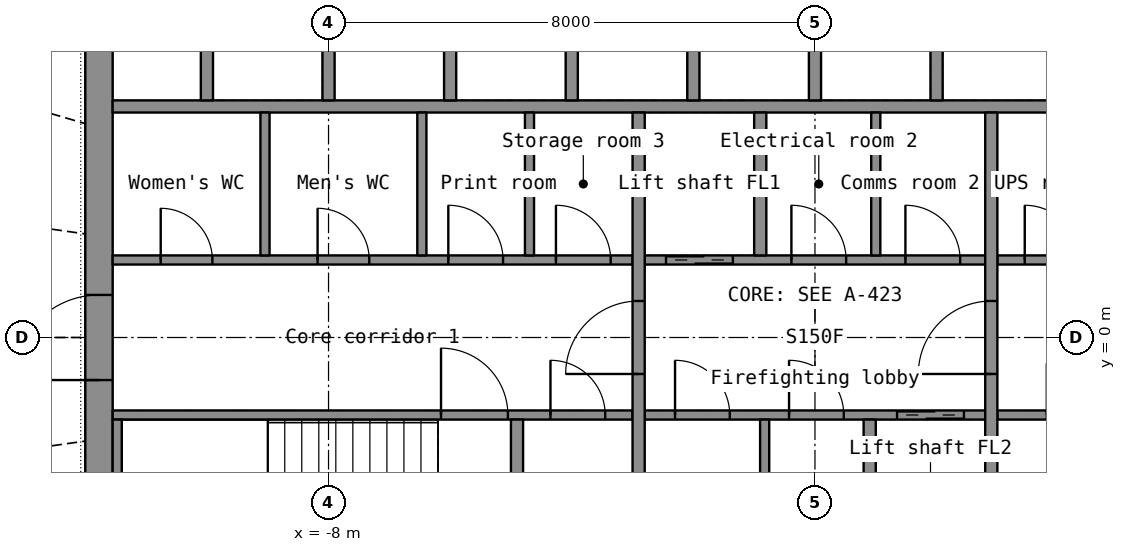
"""IFC4 building model, lengths in metres.
Left out: names, types, materials, properties, quantities, classifications, styles, units other than length and angle.
Written with IfcOpenShell. Run it as: python <this file> out.ifc"""

import sys

from ifc_helpers import new_model, si_unit, direction, frame, frame_2d, origin, place, context, subcontext, project, spatial, rectangle, extrude, element, fill, save


model = new_model("IFC4")
c1 = context("Model", 3, precision=1e-05, world=origin(), true_north=direction((0.0, 1.0)))
c2 = subcontext(c1, "Body", "Model", "MODEL_VIEW")
j1 = project(units=[si_unit("LENGTHUNIT", "METRE"), si_unit("PLANEANGLEUNIT", "RADIAN")], contexts=[c1])
p1 = place(None, origin())
s1 = spatial("IfcSite", under=j1, at=p1, CompositionType="ELEMENT")
p2 = place(p1, origin())
s2 = spatial("IfcBuilding", under=s1, at=p2, CompositionType="ELEMENT")
p3 = place(p2, frame((0.0, 0.0, 175.6)))
s3 = spatial("IfcBuildingStorey", under=s2, at=p3, CompositionType="ELEMENT", Elevation=175.6)
p4 = place(p3, frame((-11.775, -7.2, 0.0), z_axis=(0.0, 0.0, 1.0), x_axis=(0.0, 1.0, 0.0)))
e1 = element("IfcWall", 1, at=p4, inside=s3, PredefinedType="SHEAR", context=c2, shape_type="SweptSolid", body=[
    extrude(rectangle(XDim=14.4, YDim=0.45, at=frame_2d((7.2, 0.0))), origin(), (0.0, 0.0, 1.0), 3.3),
])
p5 = place(p4, frame((6.5, 0.0, 0.0)))
e2 = element("IfcOpeningElement", 2, at=p5, cuts=e1, PredefinedType="OPENING", context=c2, shape_type="SweptSolid", body=[
    extrude(rectangle(XDim=1.4, YDim=2.2, at=frame_2d((0.7, 1.1))), frame((0.0, 0.235, 0.0), z_axis=(0.0, -1.0, 0.0), x_axis=(1.0, 0.0, 0.0)), (0.0, 0.0, 1.0), 0.47),
])
p6 = place(p3, frame((-11.55, 3.8, 0.0), z_axis=(0.0, 0.0, 1.0), x_axis=(1.0, 0.0, 0.0)))
e3 = element("IfcWall", 3, at=p6, inside=s3, PredefinedType="SHEAR", context=c2, shape_type="SweptSolid", body=[
    extrude(rectangle(XDim=23.1, YDim=0.2, at=frame_2d((11.55, 0.0))), origin(), (0.0, 0.0, 1.0), 3.3),
])
for number, where, z_axis, x_axis in (
    (4, (-10.0, 3.9, 0.0), (0.0, 0.0, 1.0), (0.0, 1.0, 0.0)),
    (5, (-8.0, 3.9, 0.0), (0.0, 0.0, 1.0), (0.0, 1.0, 0.0)),
    (6, (-6.0, 3.9, 0.0), (0.0, 0.0, 1.0), (0.0, 1.0, 0.0)),
    (7, (-4.0, 3.9, 0.0), (0.0, 0.0, 1.0), (0.0, 1.0, 0.0)),
    (8, (-2.0, 3.9, 0.0), (0.0, 0.0, 1.0), (0.0, 1.0, 0.0)),
    (9, (0.0, 3.9, 0.0), (0.0, 0.0, 1.0), (0.0, 1.0, 0.0)),
    (10, (2.0, 3.9, 0.0), (0.0, 0.0, 1.0), (0.0, 1.0, 0.0)),
):
    element("IfcWall", number, at=place(p3, frame(where, z_axis=z_axis, x_axis=x_axis)), inside=s3, PredefinedType="SHEAR", context=c2, shape_type="SweptSolid", body=[
        extrude(rectangle(XDim=2.85, YDim=0.2, at=frame_2d((1.425, 0.0))), origin(), (0.0, 0.0, 1.0), 3.3),
    ])
p7 = place(p3, frame((-11.55, -1.275, 0.0), z_axis=(0.0, 0.0, 1.0), x_axis=(1.0, 0.0, 0.0)))
e11 = element("IfcWall", 11, at=p7, inside=s3, PredefinedType="SHEAR", context=c2, shape_type="SweptSolid", body=[
    extrude(rectangle(XDim=8.55, YDim=0.15, at=frame_2d((4.275, 0.0))), origin(), (0.0, 0.0, 1.0), 3.3),
])
p8 = place(p7, frame((5.4, 0.0, 0.0)))
e12 = element("IfcOpeningElement", 12, at=p8, cuts=e11, PredefinedType="OPENING", context=c2, shape_type="SweptSolid", body=[
    extrude(rectangle(XDim=1.1, YDim=2.15, at=frame_2d((0.55, 1.075))), frame((0.0, 0.085, 0.0), z_axis=(0.0, -1.0, 0.0), x_axis=(1.0, 0.0, 0.0)), (0.0, 0.0, 1.0), 0.17),
])
p9 = place(p7, frame((7.2, 0.0, 0.0)))
e13 = element("IfcOpeningElement", 13, at=p9, cuts=e11, PredefinedType="OPENING", context=c2, shape_type="SweptSolid", body=[
    extrude(rectangle(XDim=0.9, YDim=2.1, at=frame_2d((0.45, 1.05))), frame((0.0, 0.085, 0.0), z_axis=(0.0, -1.0, 0.0), x_axis=(1.0, 0.0, 0.0)), (0.0, 0.0, 1.0), 0.17),
])
p10 = place(p3, frame((-2.8, -1.275, 0.0), z_axis=(0.0, 0.0, 1.0), x_axis=(1.0, 0.0, 0.0)))
e14 = element("IfcWall", 14, at=p10, inside=s3, PredefinedType="SHEAR", context=c2, shape_type="SweptSolid", body=[
    extrude(rectangle(XDim=5.6, YDim=0.15, at=frame_2d((2.8, 0.0))), origin(), (0.0, 0.0, 1.0), 3.3),
])
p11 = place(p10, frame((4.15, 0.0, 0.0)))
e15 = element("IfcOpeningElement", 15, at=p11, cuts=e14, PredefinedType="OPENING", context=c2, shape_type="SweptSolid", body=[
    extrude(rectangle(XDim=1.1, YDim=2.2, at=frame_2d((0.55, 1.1))), frame((0.0, 0.085, 0.0), z_axis=(0.0, -1.0, 0.0), x_axis=(1.0, 0.0, 0.0)), (0.0, 0.0, 1.0), 0.17),
])
p12 = place(p10, frame((0.499, 0.0, 0.0)))
e16 = element("IfcOpeningElement", 16, at=p12, cuts=e14, PredefinedType="OPENING", context=c2, shape_type="SweptSolid", body=[
    extrude(rectangle(XDim=0.9, YDim=2.1, at=frame_2d((0.45, 1.05))), frame((0.0, 0.085, 0.0), z_axis=(0.0, -1.0, 0.0), x_axis=(1.0, 0.0, 0.0)), (0.0, 0.0, 1.0), 0.17),
])
p13 = place(p10, frame((2.374, 0.0, 0.0)))
e17 = element("IfcOpeningElement", 17, at=p13, cuts=e14, PredefinedType="OPENING", context=c2, shape_type="SweptSolid", body=[
    extrude(rectangle(XDim=0.9, YDim=2.1, at=frame_2d((0.45, 1.05))), frame((0.0, 0.085, 0.0), z_axis=(0.0, -1.0, 0.0), x_axis=(1.0, 0.0, 0.0)), (0.0, 0.0, 1.0), 0.17),
])
p14 = place(p3, frame((3.0, -1.275, 0.0), z_axis=(0.0, 0.0, 1.0), x_axis=(1.0, 0.0, 0.0)))
e18 = element("IfcWall", 18, at=p14, inside=s3, PredefinedType="PARTITIONING", context=c2, shape_type="SweptSolid", body=[
    extrude(rectangle(XDim=8.55, YDim=0.15, at=frame_2d((4.275, 0.0))), origin(), (0.0, 0.0, 1.0), 3.3),
])
p15 = place(p14, frame((0.812, 0.0, 0.0)))
e19 = element("IfcOpeningElement", 19, at=p15, cuts=e18, PredefinedType="OPENING", context=c2, shape_type="SweptSolid", body=[
    extrude(rectangle(XDim=0.85, YDim=2.1, at=frame_2d((0.425, 1.05))), frame((0.0, 0.085, 0.0), z_axis=(0.0, -1.0, 0.0), x_axis=(1.0, 0.0, 0.0)), (0.0, 0.0, 1.0), 0.17),
])
p16 = place(p14, frame((3.083, 0.0, 0.0)))
e20 = element("IfcOpeningElement", 20, at=p16, cuts=e18, PredefinedType="OPENING", context=c2, shape_type="SweptSolid", body=[
    extrude(rectangle(XDim=0.9, YDim=2.1, at=frame_2d((0.45, 1.05))), frame((0.0, 0.085, 0.0), z_axis=(0.0, -1.0, 0.0), x_axis=(1.0, 0.0, 0.0)), (0.0, 0.0, 1.0), 0.17),
])
p17 = place(p14, frame((6.12, 0.0, 0.0)))
e21 = element("IfcOpeningElement", 21, at=p17, cuts=e18, PredefinedType="OPENING", context=c2, shape_type="SweptSolid", body=[
    extrude(rectangle(XDim=0.9, YDim=2.1, at=frame_2d((0.45, 1.05))), frame((0.0, 0.085, 0.0), z_axis=(0.0, -1.0, 0.0), x_axis=(1.0, 0.0, 0.0)), (0.0, 0.0, 1.0), 0.17),
])
p18 = place(p3, frame((-11.55, 1.275, 0.0), z_axis=(0.0, 0.0, 1.0), x_axis=(1.0, 0.0, 0.0)))
e22 = element("IfcWall", 22, at=p18, inside=s3, PredefinedType="PARTITIONING", context=c2, shape_type="SweptSolid", body=[
    extrude(rectangle(XDim=8.55, YDim=0.15, at=frame_2d((4.275, 0.0))), origin(), (0.0, 0.0, 1.0), 3.3),
])
p19 = place(p18, frame((0.79, 0.0, 0.0)))
e23 = element("IfcOpeningElement", 23, at=p19, cuts=e22, PredefinedType="OPENING", context=c2, shape_type="SweptSolid", body=[
    extrude(rectangle(XDim=0.85, YDim=2.1, at=frame_2d((0.425, 1.05))), frame((0.0, 0.085, 0.0), z_axis=(0.0, -1.0, 0.0), x_axis=(1.0, 0.0, 0.0)), (0.0, 0.0, 1.0), 0.17),
])
p20 = place(p18, frame((3.37, 0.0, 0.0)))
e24 = element("IfcOpeningElement", 24, at=p20, cuts=e22, PredefinedType="OPENING", context=c2, shape_type="SweptSolid", body=[
    extrude(rectangle(XDim=0.85, YDim=2.1, at=frame_2d((0.425, 1.05))), frame((0.0, 0.085, 0.0), z_axis=(0.0, -1.0, 0.0), x_axis=(1.0, 0.0, 0.0)), (0.0, 0.0, 1.0), 0.17),
])
p21 = place(p18, frame((5.52, 0.0, 0.0)))
e25 = element("IfcOpeningElement", 25, at=p21, cuts=e22, PredefinedType="OPENING", context=c2, shape_type="SweptSolid", body=[
    extrude(rectangle(XDim=0.9, YDim=2.1, at=frame_2d((0.45, 1.05))), frame((0.0, 0.085, 0.0), z_axis=(0.0, -1.0, 0.0), x_axis=(1.0, 0.0, 0.0)), (0.0, 0.0, 1.0), 0.17),
])
p22 = place(p18, frame((7.29, 0.0, 0.0)))
e26 = element("IfcOpeningElement", 26, at=p22, cuts=e22, PredefinedType="OPENING", context=c2, shape_type="SweptSolid", body=[
    extrude(rectangle(XDim=0.9, YDim=2.1, at=frame_2d((0.45, 1.05))), frame((0.0, 0.085, 0.0), z_axis=(0.0, -1.0, 0.0), x_axis=(1.0, 0.0, 0.0)), (0.0, 0.0, 1.0), 0.17),
])
p23 = place(p3, frame((-2.8, 1.275, 0.0), z_axis=(0.0, 0.0, 1.0), x_axis=(1.0, 0.0, 0.0)))
e27 = element("IfcWall", 27, at=p23, inside=s3, PredefinedType="SHEAR", context=c2, shape_type="SweptSolid", body=[
    extrude(rectangle(XDim=5.6, YDim=0.15, at=frame_2d((2.8, 0.0))), origin(), (0.0, 0.0, 1.0), 3.3),
])
p24 = place(p23, frame((0.35, 0.0, 0.0)))
e28 = element("IfcOpeningElement", 28, at=p24, cuts=e27, PredefinedType="OPENING", context=c2, shape_type="SweptSolid", body=[
    extrude(rectangle(XDim=1.1, YDim=2.2, at=frame_2d((0.55, 1.1))), frame((0.0, 0.085, 0.0), z_axis=(0.0, -1.0, 0.0), x_axis=(1.0, 0.0, 0.0)), (0.0, 0.0, 1.0), 0.17),
])
p25 = place(p23, frame((2.413, 0.0, 0.0)))
e29 = element("IfcOpeningElement", 29, at=p25, cuts=e27, PredefinedType="OPENING", context=c2, shape_type="SweptSolid", body=[
    extrude(rectangle(XDim=0.9, YDim=2.1, at=frame_2d((0.45, 1.05))), frame((0.0, 0.085, 0.0), z_axis=(0.0, -1.0, 0.0), x_axis=(1.0, 0.0, 0.0)), (0.0, 0.0, 1.0), 0.17),
])
p26 = place(p23, frame((4.288, 0.0, 0.0)))
e30 = element("IfcOpeningElement", 30, at=p26, cuts=e27, PredefinedType="OPENING", context=c2, shape_type="SweptSolid", body=[
    extrude(rectangle(XDim=0.9, YDim=2.1, at=frame_2d((0.45, 1.05))), frame((0.0, 0.085, 0.0), z_axis=(0.0, -1.0, 0.0), x_axis=(1.0, 0.0, 0.0)), (0.0, 0.0, 1.0), 0.17),
])
p27 = place(p3, frame((3.0, 1.275, 0.0), z_axis=(0.0, 0.0, 1.0), x_axis=(1.0, 0.0, 0.0)))
e31 = element("IfcWall", 31, at=p27, inside=s3, PredefinedType="SHEAR", context=c2, shape_type="SweptSolid", body=[
    extrude(rectangle(XDim=8.55, YDim=0.15, at=frame_2d((4.275, 0.0))), origin(), (0.0, 0.0, 1.0), 3.3),
])
p28 = place(p27, frame((2.05, 0.0, 0.0)))
e32 = element("IfcOpeningElement", 32, at=p28, cuts=e31, PredefinedType="OPENING", context=c2, shape_type="SweptSolid", body=[
    extrude(rectangle(XDim=1.1, YDim=2.15, at=frame_2d((0.55, 1.075))), frame((0.0, 0.085, 0.0), z_axis=(0.0, -1.0, 0.0), x_axis=(1.0, 0.0, 0.0)), (0.0, 0.0, 1.0), 0.17),
])
p29 = place(p27, frame((0.45, 0.0, 0.0)))
e33 = element("IfcOpeningElement", 33, at=p29, cuts=e31, PredefinedType="OPENING", context=c2, shape_type="SweptSolid", body=[
    extrude(rectangle(XDim=0.9, YDim=2.1, at=frame_2d((0.45, 1.05))), frame((0.0, 0.085, 0.0), z_axis=(0.0, -1.0, 0.0), x_axis=(1.0, 0.0, 0.0)), (0.0, 0.0, 1.0), 0.17),
])
p30 = place(p3, frame((-2.9, -3.7, 0.0), z_axis=(0.0, 0.0, 1.0), x_axis=(0.0, 1.0, 0.0)))
e34 = element("IfcWall", 34, at=p30, inside=s3, PredefinedType="SHEAR", context=c2, shape_type="SweptSolid", body=[
    extrude(rectangle(XDim=7.4, YDim=0.2, at=frame_2d((3.7, 0.0))), origin(), (0.0, 0.0, 1.0), 3.3),
])
p31 = place(p30, frame((3.1, 0.0, 0.0)))
e35 = element("IfcOpeningElement", 35, at=p31, cuts=e34, PredefinedType="OPENING", context=c2, shape_type="SweptSolid", body=[
    extrude(rectangle(XDim=1.2, YDim=2.2, at=frame_2d((0.6, 1.1))), frame((0.0, 0.11, 0.0), z_axis=(0.0, -1.0, 0.0), x_axis=(1.0, 0.0, 0.0)), (0.0, 0.0, 1.0), 0.22),
])
p32 = place(p3, frame((2.9, -3.7, 0.0), z_axis=(0.0, 0.0, 1.0), x_axis=(0.0, 1.0, 0.0)))
e36 = element("IfcWall", 36, at=p32, inside=s3, PredefinedType="SHEAR", context=c2, shape_type="SweptSolid", body=[
    extrude(rectangle(XDim=7.4, YDim=0.2, at=frame_2d((3.7, 0.0))), origin(), (0.0, 0.0, 1.0), 3.3),
])
p33 = place(p32, frame((3.1, 0.0, 0.0)))
e37 = element("IfcOpeningElement", 37, at=p33, cuts=e36, PredefinedType="OPENING", context=c2, shape_type="SweptSolid", body=[
    extrude(rectangle(XDim=1.2, YDim=2.2, at=frame_2d((0.6, 1.1))), frame((0.0, 0.11, 0.0), z_axis=(0.0, -1.0, 0.0), x_axis=(1.0, 0.0, 0.0)), (0.0, 0.0, 1.0), 0.22),
])
for number, where, z_axis, x_axis in (
    (38, (-0.9, 1.35, 0.0), (0.0, 0.0, 1.0), (0.0, 1.0, 0.0)),
    (39, (0.9, -3.7, 0.0), (0.0, 0.0, 1.0), (0.0, 1.0, 0.0)),
):
    element("IfcWall", number, at=place(p3, frame(where, z_axis=z_axis, x_axis=x_axis)), inside=s3, PredefinedType="SHEAR", context=c2, shape_type="SweptSolid", body=[
        extrude(rectangle(XDim=2.35, YDim=0.2, at=frame_2d((1.175, 0.0))), origin(), (0.0, 0.0, 1.0), 3.3),
    ])
p34 = place(p3, frame((-11.475, -3.7, 0.0), z_axis=(0.0, 0.0, 1.0), x_axis=(0.0, 1.0, 0.0)))
e40 = element("IfcWall", 40, at=p34, inside=s3, PredefinedType="SHEAR", context=c2, shape_type="SweptSolid", body=[
    extrude(rectangle(XDim=2.35, YDim=0.15, at=frame_2d((1.175, 0.0))), origin(), (0.0, 0.0, 1.0), 3.3),
])
p35 = place(p3, frame((-4.9, -3.7, 0.0), z_axis=(0.0, 0.0, 1.0), x_axis=(0.0, 1.0, 0.0)))
e41 = element("IfcWall", 41, at=p35, inside=s3, PredefinedType="SHEAR", context=c2, shape_type="SweptSolid", body=[
    extrude(rectangle(XDim=2.35, YDim=0.2, at=frame_2d((1.175, 0.0))), origin(), (0.0, 0.0, 1.0), 3.3),
])
for number, where, z_axis, x_axis in (
    (42, (-9.045, 1.35, 0.0), (0.0, 0.0, 1.0), (0.0, 1.0, 0.0)),
    (43, (-6.465, 1.35, 0.0), (0.0, 0.0, 1.0), (0.0, 1.0, 0.0)),
    (44, (-4.695, 1.35, 0.0), (0.0, 0.0, 1.0), (0.0, 1.0, 0.0)),
    (45, (1.0, 1.35, 0.0), (0.0, 0.0, 1.0), (0.0, 1.0, 0.0)),
    (46, (-0.827, -3.7, 0.0), (0.0, 0.0, 1.0), (0.0, 1.0, 0.0)),
):
    element("IfcWall", number, at=place(p3, frame(where, z_axis=z_axis, x_axis=x_axis)), inside=s3, PredefinedType="PARTITIONING", context=c2, shape_type="SweptSolid", body=[
        extrude(rectangle(XDim=2.35, YDim=0.15, at=frame_2d((1.175, 0.0))), origin(), (0.0, 0.0, 1.0), 3.3),
    ])
p36 = place(p5, origin())
e47 = element("IfcDoor", 47, at=p36, inside=s3, OperationType="DOUBLE_DOOR_SINGLE_SWING", PredefinedType="DOOR", context=c2, shape_type="SweptSolid", body=[
    extrude(rectangle(XDim=1.4, YDim=2.2, at=frame_2d((0.7, 1.1))), frame((0.0, 0.025, 0.0), z_axis=(0.0, -1.0, 0.0), x_axis=(1.0, 0.0, 0.0)), (0.0, 0.0, 1.0), 0.05),
])
fill(e2, e47)
p37 = place(p31, origin())
e48 = element("IfcDoor", 48, at=p37, inside=s3, OperationType="SINGLE_SWING_LEFT", PredefinedType="DOOR", context=c2, shape_type="SweptSolid", body=[
    extrude(rectangle(XDim=1.2, YDim=2.2, at=frame_2d((0.6, 1.1))), frame((0.0, 0.025, 0.0), z_axis=(0.0, -1.0, 0.0), x_axis=(1.0, 0.0, 0.0)), (0.0, 0.0, 1.0), 0.05),
])
fill(e35, e48)
p38 = place(p33, origin())
e49 = element("IfcDoor", 49, at=p38, inside=s3, OperationType="SINGLE_SWING_LEFT", PredefinedType="DOOR", context=c2, shape_type="SweptSolid", body=[
    extrude(rectangle(XDim=1.2, YDim=2.2, at=frame_2d((0.6, 1.1))), frame((0.0, 0.025, 0.0), z_axis=(0.0, -1.0, 0.0), x_axis=(1.0, 0.0, 0.0)), (0.0, 0.0, 1.0), 0.05),
])
fill(e37, e49)
p39 = place(p24, origin())
e50 = element("IfcDoor", 50, at=p39, inside=s3, OperationType="DOUBLE_DOOR_SLIDING", PredefinedType="DOOR", context=c2, shape_type="SweptSolid", body=[
    extrude(rectangle(XDim=1.1, YDim=2.2, at=frame_2d((0.55, 1.1))), frame((0.0, 0.025, 0.0), z_axis=(0.0, -1.0, 0.0), x_axis=(1.0, 0.0, 0.0)), (0.0, 0.0, 1.0), 0.05),
])
fill(e28, e50)
p40 = place(p11, origin())
e51 = element("IfcDoor", 51, at=p40, inside=s3, OperationType="DOUBLE_DOOR_SLIDING", PredefinedType="DOOR", context=c2, shape_type="SweptSolid", body=[
    extrude(rectangle(XDim=1.1, YDim=2.2, at=frame_2d((0.55, 1.1))), frame((0.0, 0.025, 0.0), z_axis=(0.0, -1.0, 0.0), x_axis=(1.0, 0.0, 0.0)), (0.0, 0.0, 1.0), 0.05),
])
fill(e15, e51)
p41 = place(p8, origin())
e52 = element("IfcDoor", 52, at=p41, inside=s3, OperationType="SINGLE_SWING_LEFT", PredefinedType="DOOR", context=c2, shape_type="SweptSolid", body=[
    extrude(rectangle(XDim=1.1, YDim=2.15, at=frame_2d((0.55, 1.075))), frame((0.0, 0.025, 0.0), z_axis=(0.0, -1.0, 0.0), x_axis=(1.0, 0.0, 0.0)), (0.0, 0.0, 1.0), 0.05),
])
fill(e12, e52)
p42 = place(p19, origin())
e53 = element("IfcDoor", 53, at=p42, inside=s3, OperationType="SINGLE_SWING_LEFT", PredefinedType="DOOR", context=c2, shape_type="SweptSolid", body=[
    extrude(rectangle(XDim=0.85, YDim=2.1, at=frame_2d((0.425, 1.05))), frame((0.0, 0.025, 0.0), z_axis=(0.0, -1.0, 0.0), x_axis=(1.0, 0.0, 0.0)), (0.0, 0.0, 1.0), 0.05),
])
fill(e23, e53)
p43 = place(p20, origin())
e54 = element("IfcDoor", 54, at=p43, inside=s3, OperationType="SINGLE_SWING_LEFT", PredefinedType="DOOR", context=c2, shape_type="SweptSolid", body=[
    extrude(rectangle(XDim=0.85, YDim=2.1, at=frame_2d((0.425, 1.05))), frame((0.0, 0.025, 0.0), z_axis=(0.0, -1.0, 0.0), x_axis=(1.0, 0.0, 0.0)), (0.0, 0.0, 1.0), 0.05),
])
fill(e24, e54)
p44 = place(p21, origin())
e55 = element("IfcDoor", 55, at=p44, inside=s3, OperationType="SINGLE_SWING_LEFT", PredefinedType="DOOR", context=c2, shape_type="SweptSolid", body=[
    extrude(rectangle(XDim=0.9, YDim=2.1, at=frame_2d((0.45, 1.05))), frame((0.0, 0.025, 0.0), z_axis=(0.0, -1.0, 0.0), x_axis=(1.0, 0.0, 0.0)), (0.0, 0.0, 1.0), 0.05),
])
fill(e25, e55)
p45 = place(p22, origin())
e56 = element("IfcDoor", 56, at=p45, inside=s3, OperationType="SINGLE_SWING_LEFT", PredefinedType="DOOR", context=c2, shape_type="SweptSolid", body=[
    extrude(rectangle(XDim=0.9, YDim=2.1, at=frame_2d((0.45, 1.05))), frame((0.0, 0.025, 0.0), z_axis=(0.0, -1.0, 0.0), x_axis=(1.0, 0.0, 0.0)), (0.0, 0.0, 1.0), 0.05),
])
fill(e26, e56)
p46 = place(p25, origin())
e57 = element("IfcDoor", 57, at=p46, inside=s3, OperationType="SINGLE_SWING_LEFT", PredefinedType="DOOR", context=c2, shape_type="SweptSolid", body=[
    extrude(rectangle(XDim=0.9, YDim=2.1, at=frame_2d((0.45, 1.05))), frame((0.0, 0.025, 0.0), z_axis=(0.0, -1.0, 0.0), x_axis=(1.0, 0.0, 0.0)), (0.0, 0.0, 1.0), 0.05),
])
fill(e29, e57)
p47 = place(p26, origin())
e58 = element("IfcDoor", 58, at=p47, inside=s3, OperationType="SINGLE_SWING_LEFT", PredefinedType="DOOR", context=c2, shape_type="SweptSolid", body=[
    extrude(rectangle(XDim=0.9, YDim=2.1, at=frame_2d((0.45, 1.05))), frame((0.0, 0.025, 0.0), z_axis=(0.0, -1.0, 0.0), x_axis=(1.0, 0.0, 0.0)), (0.0, 0.0, 1.0), 0.05),
])
fill(e30, e58)
p48 = place(p12, origin())
e59 = element("IfcDoor", 59, at=p48, inside=s3, OperationType="SINGLE_SWING_LEFT", PredefinedType="DOOR", context=c2, shape_type="SweptSolid", body=[
    extrude(rectangle(XDim=0.9, YDim=2.1, at=frame_2d((0.45, 1.05))), frame((0.0, 0.025, 0.0), z_axis=(0.0, -1.0, 0.0), x_axis=(1.0, 0.0, 0.0)), (0.0, 0.0, 1.0), 0.05),
])
fill(e16, e59)
p49 = place(p13, origin())
e60 = element("IfcDoor", 60, at=p49, inside=s3, OperationType="SINGLE_SWING_LEFT", PredefinedType="DOOR", context=c2, shape_type="SweptSolid", body=[
    extrude(rectangle(XDim=0.9, YDim=2.1, at=frame_2d((0.45, 1.05))), frame((0.0, 0.025, 0.0), z_axis=(0.0, -1.0, 0.0), x_axis=(1.0, 0.0, 0.0)), (0.0, 0.0, 1.0), 0.05),
])
fill(e17, e60)
p50 = place(p29, origin())
e61 = element("IfcDoor", 61, at=p50, inside=s3, OperationType="SINGLE_SWING_LEFT", PredefinedType="DOOR", context=c2, shape_type="SweptSolid", body=[
    extrude(rectangle(XDim=0.9, YDim=2.1, at=frame_2d((0.45, 1.05))), frame((0.0, 0.025, 0.0), z_axis=(0.0, -1.0, 0.0), x_axis=(1.0, 0.0, 0.0)), (0.0, 0.0, 1.0), 0.05),
])
fill(e33, e61)
p51 = place(p9, origin())
e62 = element("IfcDoor", 62, at=p51, inside=s3, OperationType="SINGLE_SWING_LEFT", PredefinedType="DOOR", context=c2, shape_type="SweptSolid", body=[
    extrude(rectangle(XDim=0.9, YDim=2.1, at=frame_2d((0.45, 1.05))), frame((0.0, 0.025, 0.0), z_axis=(0.0, -1.0, 0.0), x_axis=(1.0, 0.0, 0.0)), (0.0, 0.0, 1.0), 0.05),
])
fill(e13, e62)
save(model, sys.argv[1])
